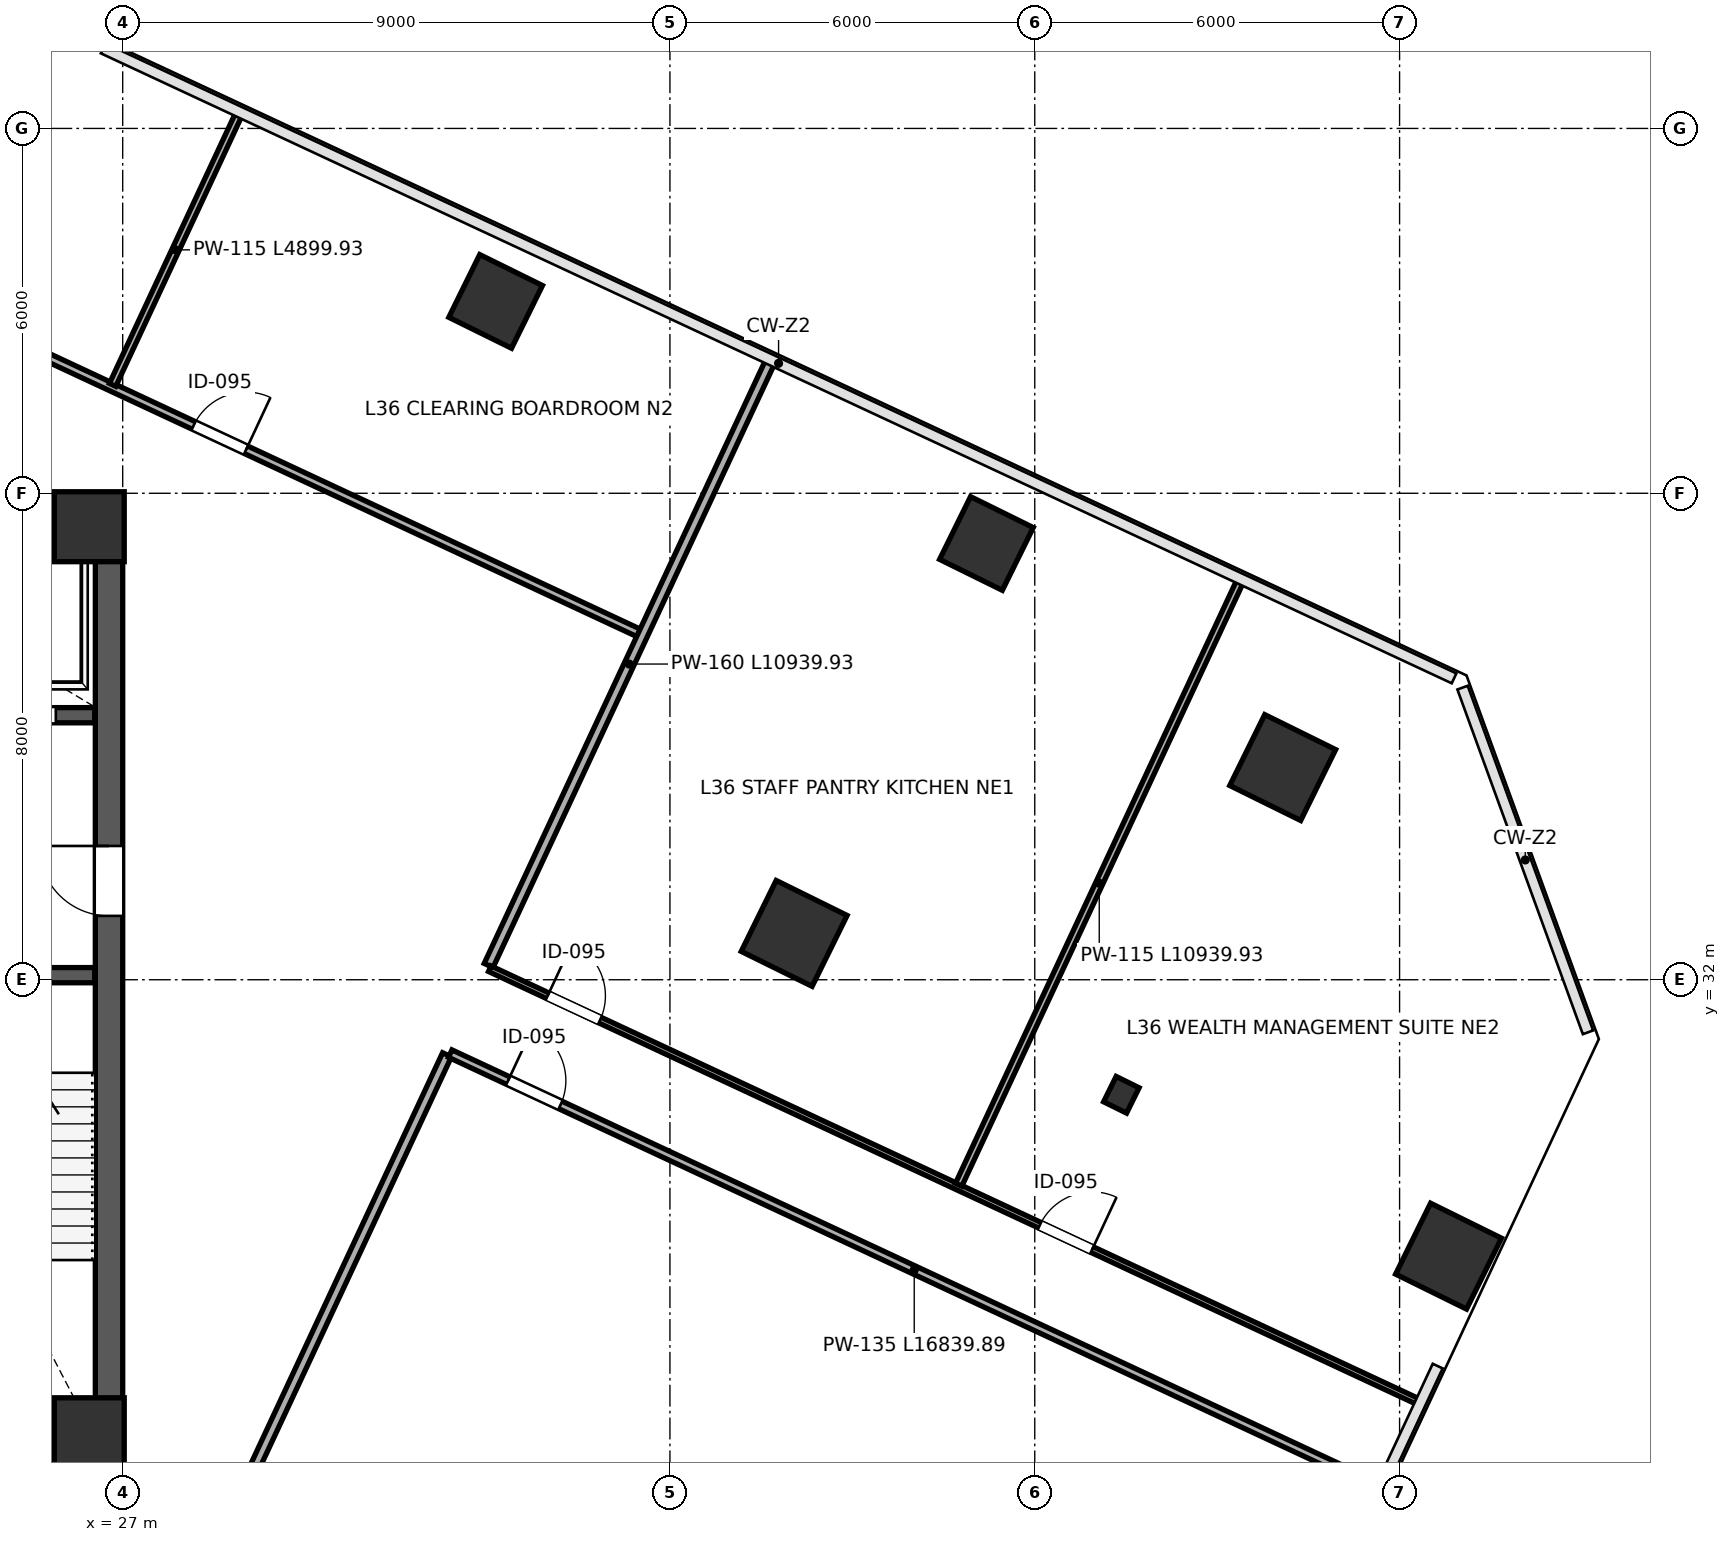
"""IFC4 building model, lengths in metres.
Left out: names, types, materials, properties, quantities, classifications, styles, units other than length and angle.
Written with IfcOpenShell. Run it as: python <this file> out.ifc"""

import sys

from ifc_helpers import new_model, si_unit, direction, frame, frame_2d, origin, origin_2d, place, context, subcontext, project, spatial, rectangle, i_section, extrude, clip, halfspace, source, transform, mapped, element, fill, save


model = new_model("IFC4")
c1 = context("Model", 3, precision=1e-05, world=origin(), true_north=direction((0.0, 1.0)))
c2 = subcontext(c1, "Body", "Model", "MODEL_VIEW")
j1 = project(units=[si_unit("LENGTHUNIT", "METRE"), si_unit("PLANEANGLEUNIT", "RADIAN")], contexts=[c1])
p1 = place(None, origin())
s1 = spatial("IfcSite", under=j1, at=p1, CompositionType="ELEMENT")
p2 = place(p1, origin())
s2 = spatial("IfcBuilding", under=s1, at=p2, CompositionType="ELEMENT")
p3 = place(p2, frame((0.0, 0.0, 162.4)))
s3 = spatial("IfcBuildingStorey", under=s2, at=p3, CompositionType="ELEMENT", Elevation=162.4)
m1 = source(origin(), c2, "Body", "SweptSolid", [
    extrude(rectangle(XDim=1.15, YDim=1.15, at=origin_2d()), origin(), (0.0, 0.0, 1.0), 4.199),
])
for number, where, z_axis, x_axis in (
    (1, (26.45, 24.55, 0.001), (0.0, 0.0, 1.0), (1.0, 0.0, 0.0)),
    (2, (26.45, 39.45, 0.001), (0.0, 0.0, 1.0), (1.0, 0.0, 0.0)),
):
    element("IfcColumn", number, at=place(p3, frame(where, z_axis=z_axis, x_axis=x_axis)), inside=s3, PredefinedType="COLUMN", context=c2, shape_type="MappedRepresentation", body=[
        mapped(m1, transform((0.0, 0.0, 0.0), scale=1.0)),
    ])
p4 = place(p3, frame((25.062, 47.135, 0.0), z_axis=(0.078215080244, -0.019293053127, 0.996749807787), x_axis=(-0.642812730681, -0.765194262388, 0.0356305218)))
e3 = element("IfcColumn", 3, at=p4, inside=s3, PredefinedType="COLUMN", context=c2, shape_type="Clipping", body=[
    clip(clip(extrude(rectangle(XDim=1.15, YDim=1.15, at=origin_2d()), origin(), (0.0, 0.0, 1.0), 4.214), halfspace(frame((0.0, 0.0, 0.063), z_axis=(0.0, 0.0, -1.0), x_axis=(1.0, 0.0, 0.0)), False)), halfspace(frame((0.0, 0.0, 4.151), z_axis=(0.0, 0.0, 1.0), x_axis=(1.0, 0.0, 0.0)), False)),
])
p5 = place(p3, frame((33.134, 43.155, 0.0), z_axis=(0.057054699059, -0.060819729961, 0.996516794521), x_axis=(-0.955655307029, -0.292168689641, 0.036883477871)))
e4 = element("IfcColumn", 4, at=p5, inside=s3, PredefinedType="COLUMN", context=c2, shape_type="Clipping", body=[
    clip(clip(extrude(rectangle(XDim=1.15, YDim=1.15, at=origin_2d()), origin(), (0.0, 0.0, 1.0), 4.215), halfspace(frame((0.0, 0.0, 0.065), z_axis=(0.0, 0.0, -1.0), x_axis=(1.0, 0.0, 0.0)), False)), halfspace(frame((0.0, 0.0, 4.15), z_axis=(0.0, 0.0, 1.0), x_axis=(1.0, 0.0, 0.0)), False)),
])
p6 = place(p3, frame((38.043, 32.762, 0.0), z_axis=(0.003011431588, -0.085652063822, 0.996320558476), x_axis=(-0.911802517527, 0.408875626491, 0.037906346343)))
e5 = element("IfcColumn", 5, at=p6, inside=s3, PredefinedType="COLUMN", context=c2, shape_type="Clipping", body=[
    clip(clip(extrude(rectangle(XDim=1.3, YDim=1.3, at=origin_2d()), origin(), (0.0, 0.0, 1.0), 4.216), halfspace(frame((0.0, 0.0, 0.076), z_axis=(0.0, 0.0, -1.0), x_axis=(1.0, 0.0, 0.0)), False)), halfspace(frame((0.0, 0.0, 4.14), z_axis=(0.0, 0.0, 1.0), x_axis=(1.0, 0.0, 0.0)), False)),
])
p7 = place(p3, frame((41.205, 39.174, 0.0), z_axis=(0.035941942904, -0.102105165773, 0.994124092789), x_axis=(-0.9919833284, 0.116948487131, 0.047876168741)))
e6 = element("IfcColumn", 6, at=p7, inside=s3, PredefinedType="COLUMN", context=c2, shape_type="Clipping", body=[
    clip(clip(extrude(rectangle(XDim=1.15, YDim=1.15, at=origin_2d()), origin(), (0.0, 0.0, 1.0), 4.225), halfspace(frame((0.0, 0.0, 0.085), z_axis=(0.0, 0.0, -1.0), x_axis=(1.0, 0.0, 0.0)), False)), halfspace(frame((0.0, 0.0, 4.14), z_axis=(0.0, 0.0, 1.0), x_axis=(1.0, 0.0, 0.0)), False)),
])
p8 = place(p3, frame((43.424, 30.108, 0.0), z_axis=(-0.011030187366, -0.113073857916, 0.993525358319), x_axis=(-0.849973005928, 0.52442440846, 0.050248671683)))
e7 = element("IfcColumn", 7, at=p8, inside=s3, PredefinedType="COLUMN", context=c2, shape_type="Clipping", body=[
    clip(clip(extrude(i_section(OverallWidth=0.421, OverallDepth=0.465, WebThickness=0.045, FlangeThickness=0.072, FilletRadius=0.015, at=origin_2d()), origin(), (0.0, 0.0, 1.0), 4.228), halfspace(frame((0.0, 0.0, 0.035), z_axis=(0.0, 0.0, -1.0), x_axis=(1.0, 0.0, 0.0)), False)), halfspace(frame((0.0, 0.0, 4.192), z_axis=(0.0, 0.0, 1.0), x_axis=(1.0, 0.0, 0.0)), False)),
])
p9 = place(p3, frame((46.078, 35.489, 0.0), z_axis=(0.016602908113, -0.126770121322, 0.991793163811), x_axis=(-0.946242453733, 0.318476943078, 0.056547815886)))
e8 = element("IfcColumn", 8, at=p9, inside=s3, PredefinedType="COLUMN", context=c2, shape_type="Clipping", body=[
    clip(clip(extrude(rectangle(XDim=1.3, YDim=1.3, at=origin_2d()), origin(), (0.0, 0.0, 1.0), 4.235), halfspace(frame((0.0, 0.0, 0.113), z_axis=(0.0, 0.0, -1.0), x_axis=(1.0, 0.0, 0.0)), False)), halfspace(frame((0.0, 0.0, 4.122), z_axis=(0.0, 0.0, 1.0), x_axis=(1.0, 0.0, 0.0)), False)),
])
p10 = place(p3, frame((48.805, 27.454, 0.0), z_axis=(-0.024912258865, -0.140153031398, 0.989816400727), x_axis=(-0.806415976218, 0.587987536694, 0.062959748993)))
e9 = element("IfcColumn", 9, at=p10, inside=s3, PredefinedType="COLUMN", context=c2, shape_type="Clipping", body=[
    clip(clip(extrude(rectangle(XDim=1.3, YDim=1.3, at=origin_2d()), origin(), (0.0, 0.0, 1.0), 4.243), halfspace(frame((0.0, 0.0, 0.126), z_axis=(0.0, 0.0, -1.0), x_axis=(1.0, 0.0, 0.0)), False)), halfspace(frame((0.0, 0.0, 4.117), z_axis=(0.0, 0.0, 1.0), x_axis=(1.0, 0.0, 0.0)), False)),
])
p11 = place(p3, frame((26.775, 24.45, 0.0), z_axis=(0.0, 0.0, 1.0), x_axis=(0.0, 1.0, 0.0)))
e10 = element("IfcWall", 10, at=p11, inside=s3, PredefinedType="SHEAR", context=c2, shape_type="SweptSolid", body=[
    extrude(rectangle(XDim=15.1, YDim=0.45, at=frame_2d((7.55, 0.0))), origin(), (0.0, 0.0, 1.0), 3.96),
])
p12 = place(p11, frame((8.6, 0.0, 0.0)))
e11 = element("IfcOpeningElement", 11, at=p12, cuts=e10, PredefinedType="OPENING", context=c2, shape_type="SweptSolid", body=[
    extrude(rectangle(XDim=1.15, YDim=2.2, at=frame_2d((0.575, 1.1))), frame((0.0, 0.235, 0.0), z_axis=(0.0, -1.0, 0.0), x_axis=(1.0, 0.0, 0.0)), (0.0, 0.0, 1.0), 0.47),
])
for number, where, z_axis, x_axis in (
    (12, (9.0, 24.225, 0.0), (0.0, 0.0, 1.0), (1.0, 0.0, 0.0)),
    (13, (9.0, 39.775, 0.0), (0.0, 0.0, 1.0), (1.0, 0.0, 0.0)),
):
    element("IfcWall", number, at=place(p3, frame(where, z_axis=z_axis, x_axis=x_axis)), inside=s3, PredefinedType="SHEAR", context=c2, shape_type="SweptSolid", body=[
        extrude(rectangle(XDim=18.0, YDim=0.45, at=frame_2d((9.0, 0.0))), origin(), (0.0, 0.0, 1.0), 3.96),
    ])
p13 = place(p3, frame((23.19, 32.075, 0.0), z_axis=(0.0, 0.0, 1.0), x_axis=(1.0, 0.0, 0.0)))
e14 = element("IfcWall", 14, at=p13, inside=s3, PredefinedType="SHEAR", context=c2, shape_type="SweptSolid", body=[
    extrude(rectangle(XDim=3.35, YDim=0.25, at=frame_2d((1.675, 0.0))), origin(), (0.0, 0.0, 1.0), 3.96),
])
p14 = place(p13, frame((0.85, 0.0, 0.0)))
e15 = element("IfcOpeningElement", 15, at=p14, cuts=e14, PredefinedType="OPENING", context=c2, shape_type="SweptSolid", body=[
    extrude(rectangle(XDim=1.15, YDim=2.2, at=frame_2d((0.575, 1.1))), frame((0.0, 0.135, 0.0), z_axis=(0.0, -1.0, 0.0), x_axis=(1.0, 0.0, 0.0)), (0.0, 0.0, 1.0), 0.27),
])
p15 = place(p3, frame((21.45, 36.35, 0.0), z_axis=(0.0, 0.0, 1.0), x_axis=(1.0, 0.0, 0.0)))
e16 = element("IfcWall", 16, at=p15, inside=s3, PredefinedType="SHEAR", context=c2, shape_type="SweptSolid", body=[
    extrude(rectangle(XDim=5.09, YDim=0.25, at=frame_2d((2.545, 0.0))), origin(), (0.0, 0.0, 1.0), 3.96),
])
p16 = place(p15, frame((0.7, 0.0, 0.0)))
e17 = element("IfcOpeningElement", 17, at=p16, cuts=e16, PredefinedType="OPENING", context=c2, shape_type="SweptSolid", body=[
    extrude(rectangle(XDim=1.2, YDim=2.2, at=frame_2d((0.6, 1.1))), frame((0.0, 0.135, 0.0), z_axis=(0.0, -1.0, 0.0), x_axis=(1.0, 0.0, 0.0)), (0.0, 0.0, 1.0), 0.27),
])
p17 = place(p15, frame((3.25, 0.0, 0.0)))
e18 = element("IfcOpeningElement", 18, at=p17, cuts=e16, PredefinedType="OPENING", context=c2, shape_type="SweptSolid", body=[
    extrude(rectangle(XDim=1.2, YDim=2.2, at=frame_2d((0.6, 1.1))), frame((0.0, 0.135, 0.0), z_axis=(0.0, -1.0, 0.0), x_axis=(1.0, 0.0, 0.0)), (0.0, 0.0, 1.0), 0.27),
])
p18 = place(p3, frame((11.673, 48.808, 0.0), z_axis=(0.0, 0.0, 1.0), x_axis=(0.906307085664, -0.422619765836, 0.0)))
e19 = element("IfcWall", 19, at=p18, inside=s3, PredefinedType="PARTITIONING", context=c2, shape_type="SweptSolid", body=[
    extrude(rectangle(XDim=26.31, YDim=0.135, at=frame_2d((13.155, 0.0))), origin(), (0.0, 0.0, 1.0), 3.96),
])
p19 = place(p18, frame((2.1, 0.0, 0.0)))
e20 = element("IfcOpeningElement", 20, at=p19, cuts=e19, PredefinedType="OPENING", context=c2, shape_type="SweptSolid", body=[
    extrude(rectangle(XDim=0.95, YDim=2.15, at=frame_2d((0.475, 1.075))), frame((0.0, 0.078, 0.0), z_axis=(0.0, -1.0, 0.0), x_axis=(1.0, 0.0, 0.0)), (0.0, 0.0, 1.0), 0.155),
])
p20 = place(p18, frame((18.2, 0.0, 0.0)))
e21 = element("IfcOpeningElement", 21, at=p20, cuts=e19, PredefinedType="OPENING", context=c2, shape_type="SweptSolid", body=[
    extrude(rectangle(XDim=0.95, YDim=2.15, at=frame_2d((0.475, 1.075))), frame((0.0, 0.078, 0.0), z_axis=(0.0, -1.0, 0.0), x_axis=(1.0, 0.0, 0.0)), (0.0, 0.0, 1.0), 0.155),
])
p21 = place(p3, frame((26.834, 41.782, 0.0), z_axis=(0.0, 0.0, 1.0), x_axis=(0.422631768009, 0.906301488838, 0.0)))
e22 = element("IfcWall", 22, at=p21, inside=s3, PredefinedType="PARTITIONING", context=c2, shape_type="SweptSolid", body=[
    extrude(rectangle(XDim=4.9, YDim=0.115, at=frame_2d((2.45, 0.0))), origin(), (0.0, 0.0, 1.0), 3.195),
])
p22 = place(p3, frame((33.018, 32.234, 0.0), z_axis=(0.0, 0.0, 1.0), x_axis=(0.422624006235, 0.906305108313, 0.0)))
e23 = element("IfcWall", 23, at=p22, inside=s3, PredefinedType="PARTITIONING", context=c2, shape_type="SweptSolid", body=[
    extrude(rectangle(XDim=10.94, YDim=0.16, at=frame_2d((5.47, 0.0))), origin(), (0.0, 0.0, 1.0), 3.195),
])
p23 = place(p3, frame((23.256, 11.299, 0.0), z_axis=(0.0, 0.0, 1.0), x_axis=(0.422623489462, 0.906305349292, 0.0)))
e24 = element("IfcWall", 24, at=p23, inside=s3, PredefinedType="PARTITIONING", context=c2, shape_type="SweptSolid", body=[
    extrude(rectangle(XDim=21.48, YDim=0.16, at=frame_2d((10.74, 0.0))), origin(), (0.0, 0.0, 1.0), 3.96),
])
p24 = place(p3, frame((33.038, 32.181, 0.0), z_axis=(0.0, 0.0, 1.0), x_axis=(0.906309400931, -0.422614800716, 0.0)))
e25 = element("IfcWall", 25, at=p24, inside=s3, PredefinedType="PARTITIONING", context=c2, shape_type="SweptSolid", body=[
    extrude(rectangle(XDim=16.84, YDim=0.1, at=frame_2d((8.42, 0.0))), origin(), (0.0, 0.0, 1.0), 3.96),
])
p25 = place(p24, frame((1.05, 0.0, 0.0)))
e26 = element("IfcOpeningElement", 26, at=p25, cuts=e25, PredefinedType="OPENING", context=c2, shape_type="SweptSolid", body=[
    extrude(rectangle(XDim=0.95, YDim=2.15, at=frame_2d((0.475, 1.075))), frame((0.0, 0.06, 0.0), z_axis=(0.0, -1.0, 0.0), x_axis=(1.0, 0.0, 0.0)), (0.0, 0.0, 1.0), 0.12),
])
p26 = place(p24, frame((9.98, 0.0, 0.0)))
e27 = element("IfcOpeningElement", 27, at=p26, cuts=e25, PredefinedType="OPENING", context=c2, shape_type="SweptSolid", body=[
    extrude(rectangle(XDim=0.95, YDim=2.15, at=frame_2d((0.475, 1.075))), frame((0.0, 0.06, 0.0), z_axis=(0.0, -1.0, 0.0), x_axis=(1.0, 0.0, 0.0)), (0.0, 0.0, 1.0), 0.12),
])
p27 = place(p3, frame((32.387, 30.785, 0.0), z_axis=(0.0, 0.0, 1.0), x_axis=(0.906303847891, -0.422626709163, 0.0)))
e28 = element("IfcWall", 28, at=p27, inside=s3, PredefinedType="PARTITIONING", context=c2, shape_type="SweptSolid", body=[
    extrude(rectangle(XDim=16.84, YDim=0.135, at=frame_2d((8.42, 0.0))), origin(), (0.0, 0.0, 1.0), 3.96),
])
p28 = place(p27, frame((1.05, 0.0, 0.0)))
e29 = element("IfcOpeningElement", 29, at=p28, cuts=e28, PredefinedType="OPENING", context=c2, shape_type="SweptSolid", body=[
    extrude(rectangle(XDim=0.95, YDim=2.15, at=frame_2d((0.475, 1.075))), frame((0.0, 0.078, 0.0), z_axis=(0.0, -1.0, 0.0), x_axis=(1.0, 0.0, 0.0)), (0.0, 0.0, 1.0), 0.155),
])
p29 = place(p3, frame((40.749, 28.629, 0.0), z_axis=(0.0, 0.0, 1.0), x_axis=(0.422632554077, 0.906301122274, 0.0)))
e30 = element("IfcWall", 30, at=p29, inside=s3, PredefinedType="PARTITIONING", context=c2, shape_type="SweptSolid", body=[
    extrude(rectangle(XDim=10.94, YDim=0.115, at=frame_2d((5.47, 0.0))), origin(), (0.0, 0.0, 1.0), 3.96),
])
m2 = source(origin(), c2, "Body", "SweptSolid", [
    extrude(rectangle(XDim=1.15, YDim=2.2, at=frame_2d((0.575, 1.1))), frame((0.0, 0.025, 0.0), z_axis=(0.0, -1.0, 0.0), x_axis=(1.0, 0.0, 0.0)), (0.0, 0.0, 1.0), 0.05),
])
p30 = place(p12, origin())
e31 = element("IfcDoor", 31, at=p30, inside=s3, OperationType="SINGLE_SWING_RIGHT", PredefinedType="DOOR", context=c2, shape_type="MappedRepresentation", body=[
    mapped(m2, transform((0.0, 0.0, 0.0), scale=1.0)),
])
fill(e11, e31)
m3 = source(origin(), c2, "Body", "SweptSolid", [
    extrude(rectangle(XDim=1.2, YDim=2.2, at=frame_2d((0.6, 1.1))), frame((0.0, 0.025, 0.0), z_axis=(0.0, -1.0, 0.0), x_axis=(1.0, 0.0, 0.0)), (0.0, 0.0, 1.0), 0.05),
])
p31 = place(p17, origin())
e32 = element("IfcDoor", 32, at=p31, inside=s3, OperationType="SLIDING_TO_RIGHT", PredefinedType="DOOR", context=c2, shape_type="MappedRepresentation", body=[
    mapped(m3, transform((0.0, 0.0, 0.0), scale=1.0)),
])
fill(e18, e32)
m4 = source(origin(), c2, "Body", "SweptSolid", [
    extrude(rectangle(XDim=0.95, YDim=2.15, at=frame_2d((0.475, 1.075))), frame((0.0, 0.025, 0.0), z_axis=(0.0, -1.0, 0.0), x_axis=(1.0, 0.0, 0.0)), (0.0, 0.0, 1.0), 0.05),
])
p32 = place(p20, origin())
e33 = element("IfcDoor", 33, at=p32, inside=s3, OperationType="SINGLE_SWING_RIGHT", PredefinedType="DOOR", context=c2, shape_type="MappedRepresentation", body=[
    mapped(m4, transform((0.0, 0.0, 0.0), scale=1.0)),
])
fill(e21, e33)
p33 = place(p25, origin())
e34 = element("IfcDoor", 34, at=p33, inside=s3, OperationType="SINGLE_SWING_LEFT", PredefinedType="DOOR", context=c2, shape_type="MappedRepresentation", body=[
    mapped(m4, transform((0.0, 0.0, 0.0), scale=1.0)),
])
fill(e26, e34)
p34 = place(p26, origin())
e35 = element("IfcDoor", 35, at=p34, inside=s3, OperationType="SINGLE_SWING_RIGHT", PredefinedType="DOOR", context=c2, shape_type="MappedRepresentation", body=[
    mapped(m4, transform((0.0, 0.0, 0.0), scale=1.0)),
])
fill(e27, e35)
p35 = place(p28, origin())
e36 = element("IfcDoor", 36, at=p35, inside=s3, OperationType="SINGLE_SWING_LEFT", PredefinedType="DOOR", context=c2, shape_type="MappedRepresentation", body=[
    mapped(m4, transform((0.0, 0.0, 0.0), scale=1.0)),
])
fill(e29, e36)
save(model, sys.argv[1])
